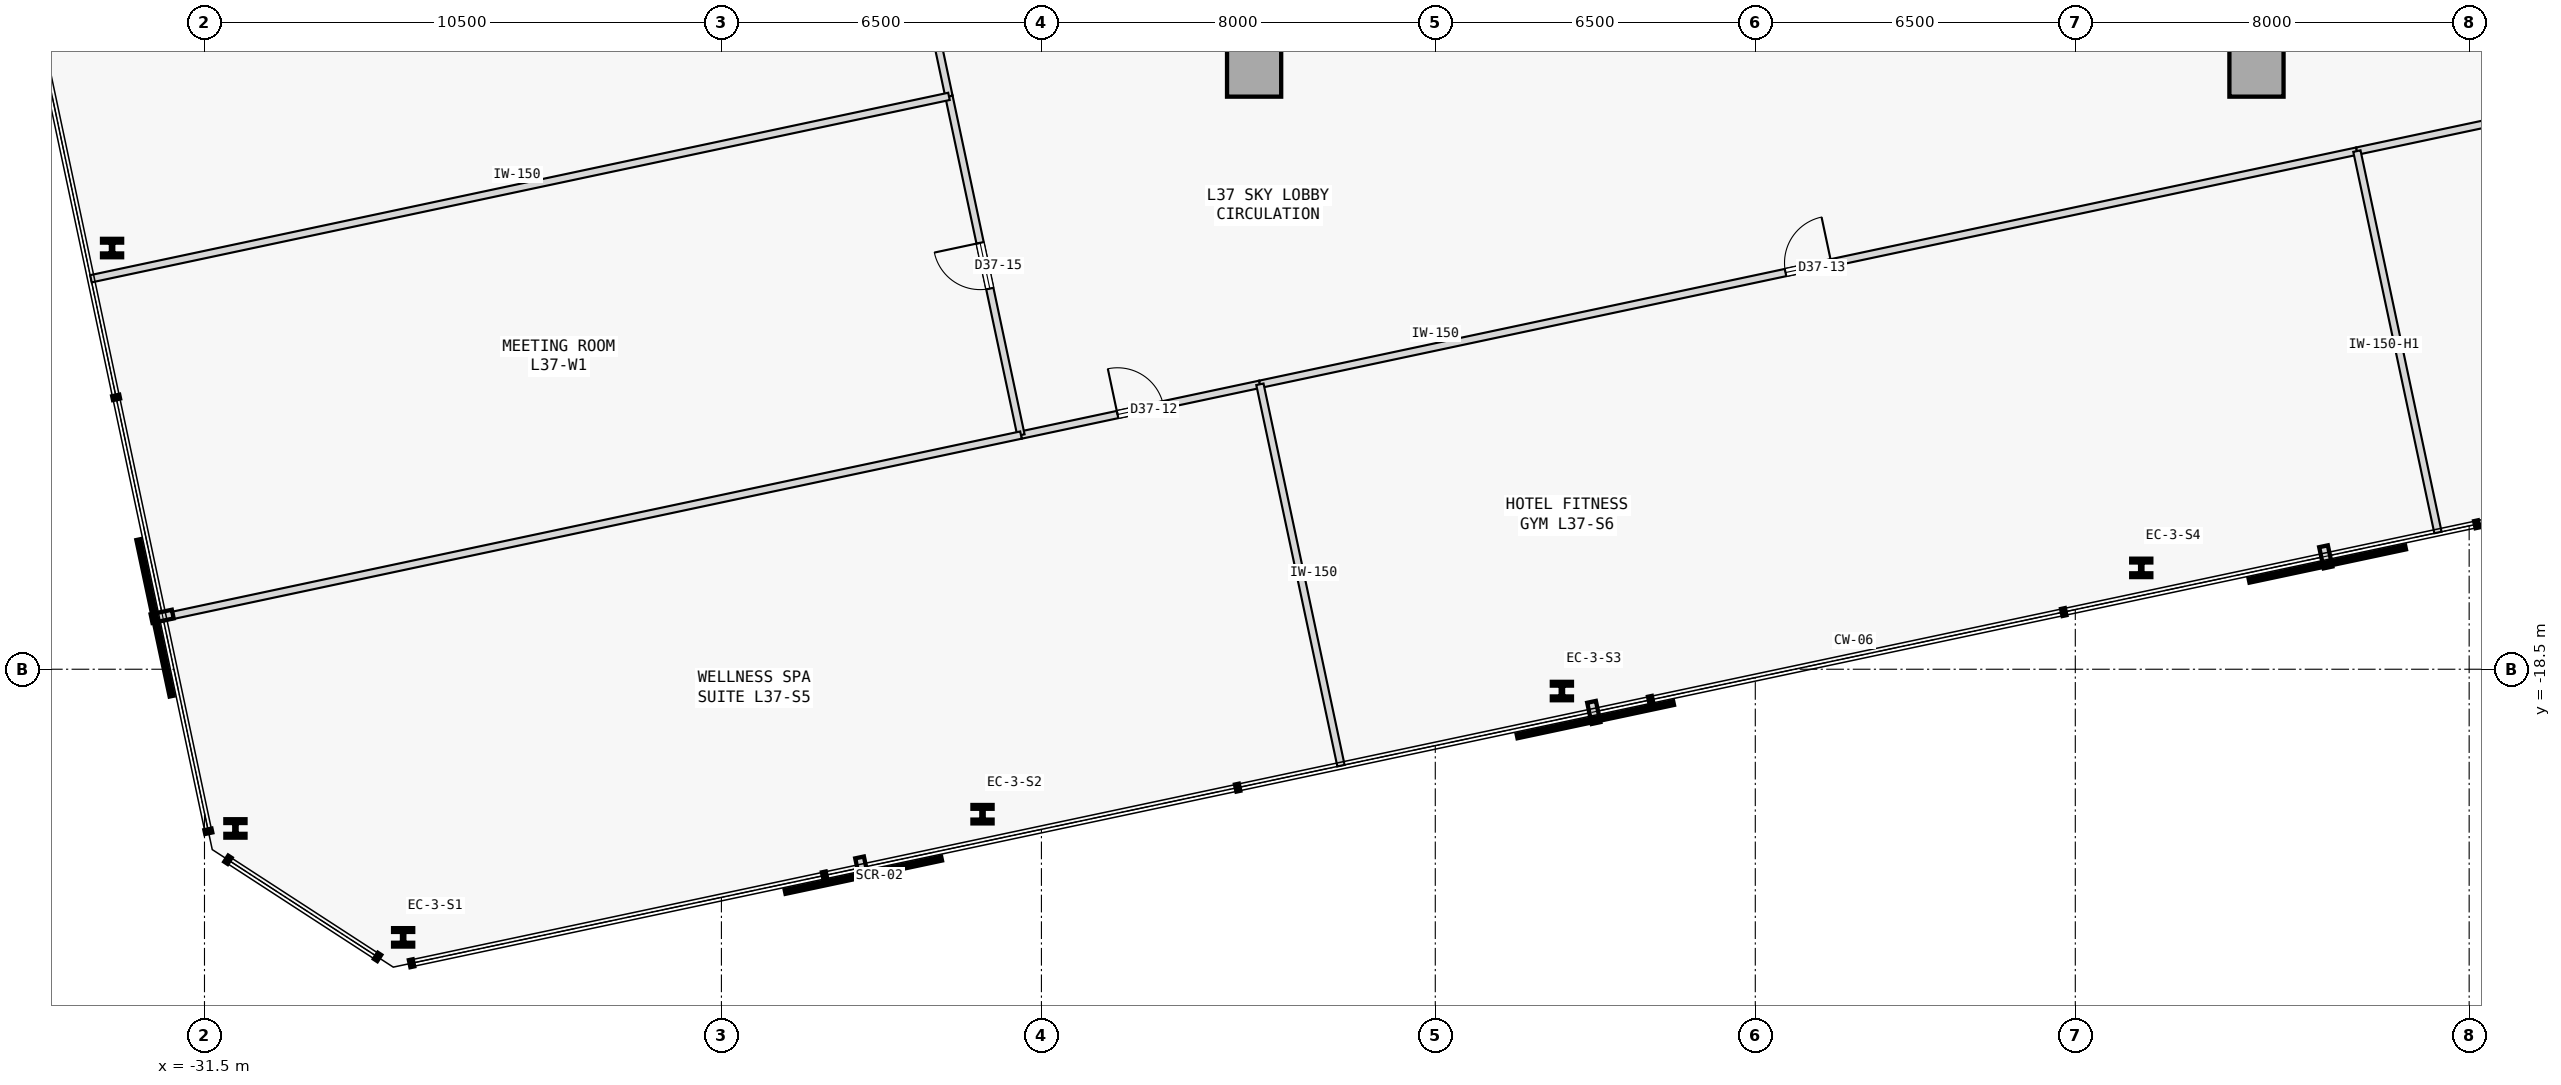
"""IFC4 building model, lengths in metres.
Left out: names, types, materials, properties, quantities, classifications, styles, units other than length and angle.
Written with IfcOpenShell. Run it as: python <this file> out.ifc"""

import sys

from ifc_helpers import new_model, si_unit, direction, frame, frame_2d, origin, origin_2d, place, context, subcontext, project, spatial, rectangle, i_section, extrude, element, fill, save


model = new_model("IFC4")
c1 = context("Model", 3, precision=1e-05, world=origin(), true_north=direction((0.0, 1.0)))
c2 = subcontext(c1, "Body", "Model", "MODEL_VIEW")
j1 = project(units=[si_unit("LENGTHUNIT", "METRE"), si_unit("PLANEANGLEUNIT", "RADIAN")], contexts=[c1])
p1 = place(None, origin())
s1 = spatial("IfcSite", under=j1, at=p1, CompositionType="ELEMENT")
p2 = place(p1, origin())
s2 = spatial("IfcBuilding", under=s1, at=p2, CompositionType="ELEMENT")
p3 = place(p2, frame((0.0, 0.0, 147.3)))
s3 = spatial("IfcBuildingStorey", under=s2, at=p3, CompositionType="ELEMENT", Elevation=147.3)
for number, where, z_axis, x_axis in (
    (1, (-10.18, -6.32, 0.0), (0.0, 0.0, 1.0), (1.0, 0.0, 0.0)),
    (2, (10.18, -6.32, 0.0), (0.0, 0.0, 1.0), (1.0, 0.0, 0.0)),
):
    element("IfcColumn", number, at=place(p3, frame(where, z_axis=z_axis, x_axis=x_axis)), inside=s3, PredefinedType="COLUMN", context=c2, shape_type="SweptSolid", body=[
        extrude(rectangle(XDim=1.1, YDim=1.1, at=origin_2d()), origin(), (0.0, 0.0, 1.0), 4.1),
    ])
for number, where, z_axis, x_axis in (
    (3, (-27.465, -23.946, 0.0), (0.0, 0.0, 1.0), (1.0, 0.0, 0.0)),
    (4, (-15.697, -21.444, 0.0), (0.0, 0.0, 1.0), (1.0, 0.0, 0.0)),
    (5, (-3.928, -18.943, 0.0), (0.0, 0.0, 1.0), (1.0, 0.0, 0.0)),
    (6, (7.84, -16.441, 0.0), (0.0, 0.0, 1.0), (1.0, 0.0, 0.0)),
    (7, (-33.377, -9.945, 0.0), (0.0, 0.0, 1.0), (1.0, 0.0, 0.0)),
    (8, (-30.871, -21.733, 0.0), (0.0, 0.0, 1.0), (1.0, 0.0, 0.0)),
):
    element("IfcColumn", number, at=place(p3, frame(where, z_axis=z_axis, x_axis=x_axis)), inside=s3, PredefinedType="COLUMN", context=c2, shape_type="SweptSolid", body=[
        extrude(i_section(OverallWidth=0.409, OverallDepth=0.374, WebThickness=0.048, FlangeThickness=0.077, FilletRadius=0.015, at=origin_2d()), origin(), (0.0, 0.0, 1.0), 4.1),
    ])
p4 = place(p3, frame((-14.916, -13.744, 0.0), z_axis=(0.0, 0.0, 1.0), x_axis=(0.978155974847, 0.207872289811, 0.0)))
e9 = element("IfcWall", 9, at=p4, inside=s3, PredefinedType="PARTITIONING", context=c2, shape_type="SweptSolid", body=[
    extrude(rectangle(XDim=4.962, YDim=0.15, at=frame_2d((2.481, 0.0))), origin(), (0.0, 0.0, 1.0), 3.875),
])
p5 = place(p4, frame((2.006, 0.0, 0.0)))
e10 = element("IfcOpeningElement", 10, at=p5, cuts=e9, PredefinedType="OPENING", context=c2, shape_type="SweptSolid", body=[
    extrude(rectangle(XDim=0.95, YDim=2.15, at=frame_2d((0.475, 1.075))), frame((0.0, 0.085, 0.0), z_axis=(0.0, -1.0, 0.0), x_axis=(1.0, 0.0, 0.0)), (0.0, 0.0, 1.0), 0.17),
])
p6 = place(p3, frame((-10.062, -12.712, 0.0), z_axis=(0.0, 0.0, 1.0), x_axis=(0.978146755646, 0.207915666603, 0.0)))
e11 = element("IfcWall", 11, at=p6, inside=s3, PredefinedType="PARTITIONING", context=c2, shape_type="SweptSolid", body=[
    extrude(rectangle(XDim=22.78, YDim=0.15, at=frame_2d((11.39, 0.0))), origin(), (0.0, 0.0, 1.0), 3.875),
])
p7 = place(p6, frame((10.915, 0.0, 0.0)))
e12 = element("IfcOpeningElement", 12, at=p7, cuts=e11, PredefinedType="OPENING", context=c2, shape_type="SweptSolid", body=[
    extrude(rectangle(XDim=0.95, YDim=2.15, at=frame_2d((0.475, 1.075))), frame((0.0, 0.085, 0.0), z_axis=(0.0, -1.0, 0.0), x_axis=(1.0, 0.0, 0.0)), (0.0, 0.0, 1.0), 0.17),
])
p8 = place(p3, frame((12.22, -7.976, 0.0), z_axis=(0.0, 0.0, 1.0), x_axis=(0.978150468613, 0.207898198049, 0.0)))
e13 = element("IfcWall", 13, at=p8, inside=s3, PredefinedType="PARTITIONING", context=c2, shape_type="SweptSolid", body=[
    extrude(rectangle(XDim=7.403, YDim=0.15, at=frame_2d((3.702, 0.0))), origin(), (0.0, 0.0, 1.0), 3.875),
])
p9 = place(p8, frame((3.227, 0.0, 0.0)))
e14 = element("IfcOpeningElement", 14, at=p9, cuts=e13, PredefinedType="OPENING", context=c2, shape_type="SweptSolid", body=[
    extrude(rectangle(XDim=0.95, YDim=2.15, at=frame_2d((0.475, 1.075))), frame((0.0, 0.085, 0.0), z_axis=(0.0, -1.0, 0.0), x_axis=(1.0, 0.0, 0.0)), (0.0, 0.0, 1.0), 0.17),
])
p10 = place(p3, frame((-14.916, -13.744, 0.0), z_axis=(0.0, 0.0, 1.0), x_axis=(-0.207904840851, 0.978149056714, 0.0)))
e15 = element("IfcWall", 15, at=p10, inside=s3, PredefinedType="PARTITIONING", context=c2, shape_type="SweptSolid", body=[
    extrude(rectangle(XDim=7.033, YDim=0.15, at=frame_2d((3.516, 0.0))), origin(), (0.0, 0.0, 1.0), 3.875),
])
p11 = place(p10, frame((3.042, 0.0, 0.0)))
e16 = element("IfcOpeningElement", 16, at=p11, cuts=e15, PredefinedType="OPENING", context=c2, shape_type="SweptSolid", body=[
    extrude(rectangle(XDim=0.95, YDim=2.15, at=frame_2d((0.475, 1.075))), frame((0.0, 0.085, 0.0), z_axis=(0.0, -1.0, 0.0), x_axis=(1.0, 0.0, 0.0)), (0.0, 0.0, 1.0), 0.17),
])
p12 = place(p3, frame((-16.378, -6.865, 0.0), z_axis=(0.0, 0.0, 1.0), x_axis=(-0.207908161816, 0.97814835084, 0.0)))
e17 = element("IfcWall", 17, at=p12, inside=s3, PredefinedType="PARTITIONING", context=c2, shape_type="SweptSolid", body=[
    extrude(rectangle(XDim=13.652, YDim=0.15, at=frame_2d((6.826, 0.0))), origin(), (0.0, 0.0, 1.0), 3.875),
])
p13 = place(p12, frame((6.351, 0.0, 0.0)))
e18 = element("IfcOpeningElement", 18, at=p13, cuts=e17, PredefinedType="OPENING", context=c2, shape_type="SweptSolid", body=[
    extrude(rectangle(XDim=0.95, YDim=2.15, at=frame_2d((0.475, 1.075))), frame((0.0, 0.085, 0.0), z_axis=(0.0, -1.0, 0.0), x_axis=(1.0, 0.0, 0.0)), (0.0, 0.0, 1.0), 0.17),
])
p14 = place(p3, frame((-8.416, -20.459, 0.0), z_axis=(0.0, 0.0, 1.0), x_axis=(-0.207922536845, 0.978145295277, 0.0)))
e19 = element("IfcWall", 19, at=p14, inside=s3, PredefinedType="PARTITIONING", context=c2, shape_type="SweptSolid", body=[
    extrude(rectangle(XDim=7.92, YDim=0.15, at=frame_2d((3.96, 0.0))), origin(), (0.0, 0.0, 1.0), 3.875),
])
p15 = place(p3, frame((-32.344, -17.448, 0.0), z_axis=(0.0, 0.0, 1.0), x_axis=(0.9781469745, 0.207914636994, 0.0)))
e20 = element("IfcWall", 20, at=p15, inside=s3, PredefinedType="PARTITIONING", context=c2, shape_type="SweptSolid", body=[
    extrude(rectangle(XDim=17.818, YDim=0.15, at=frame_2d((8.909, 0.0))), origin(), (0.0, 0.0, 1.0), 3.875),
])
p16 = place(p3, frame((13.867, -15.723, 0.0), z_axis=(0.0, 0.0, 1.0), x_axis=(-0.207916267651, 0.978146627887, 0.0)))
e21 = element("IfcWall", 21, at=p16, inside=s3, PredefinedType="PARTITIONING", context=c2, shape_type="SweptSolid", body=[
    extrude(rectangle(XDim=7.92, YDim=0.15, at=frame_2d((3.96, 0.0))), origin(), (0.0, 0.0, 1.0), 3.425),
])
p17 = place(p3, frame((-33.807, -10.569, 0.0), z_axis=(0.0, 0.0, 1.0), x_axis=(0.9781469745, 0.207914636994, 0.0)))
e22 = element("IfcWall", 22, at=p17, inside=s3, PredefinedType="PARTITIONING", context=c2, shape_type="SweptSolid", body=[
    extrude(rectangle(XDim=17.818, YDim=0.15, at=frame_2d((8.909, 0.0))), origin(), (0.0, 0.0, 1.0), 3.875),
])
p18 = place(p5, origin())
e23 = element("IfcDoor", 23, at=p18, inside=s3, OperationType="SINGLE_SWING_LEFT", PredefinedType="DOOR", context=c2, shape_type="SweptSolid", body=[
    extrude(rectangle(XDim=0.95, YDim=2.15, at=frame_2d((0.475, 1.075))), frame((0.0, 0.025, 0.0), z_axis=(0.0, -1.0, 0.0), x_axis=(1.0, 0.0, 0.0)), (0.0, 0.0, 1.0), 0.05),
])
fill(e10, e23)
p19 = place(p7, origin())
e24 = element("IfcDoor", 24, at=p19, inside=s3, OperationType="SINGLE_SWING_RIGHT", PredefinedType="DOOR", context=c2, shape_type="SweptSolid", body=[
    extrude(rectangle(XDim=0.95, YDim=2.15, at=frame_2d((0.475, 1.075))), frame((0.0, 0.025, 0.0), z_axis=(0.0, -1.0, 0.0), x_axis=(1.0, 0.0, 0.0)), (0.0, 0.0, 1.0), 0.05),
])
fill(e12, e24)
p20 = place(p11, origin())
e25 = element("IfcDoor", 25, at=p20, inside=s3, OperationType="SINGLE_SWING_RIGHT", PredefinedType="DOOR", context=c2, shape_type="SweptSolid", body=[
    extrude(rectangle(XDim=0.95, YDim=2.15, at=frame_2d((0.475, 1.075))), frame((0.0, 0.025, 0.0), z_axis=(0.0, -1.0, 0.0), x_axis=(1.0, 0.0, 0.0)), (0.0, 0.0, 1.0), 0.05),
])
fill(e16, e25)
save(model, sys.argv[1])
